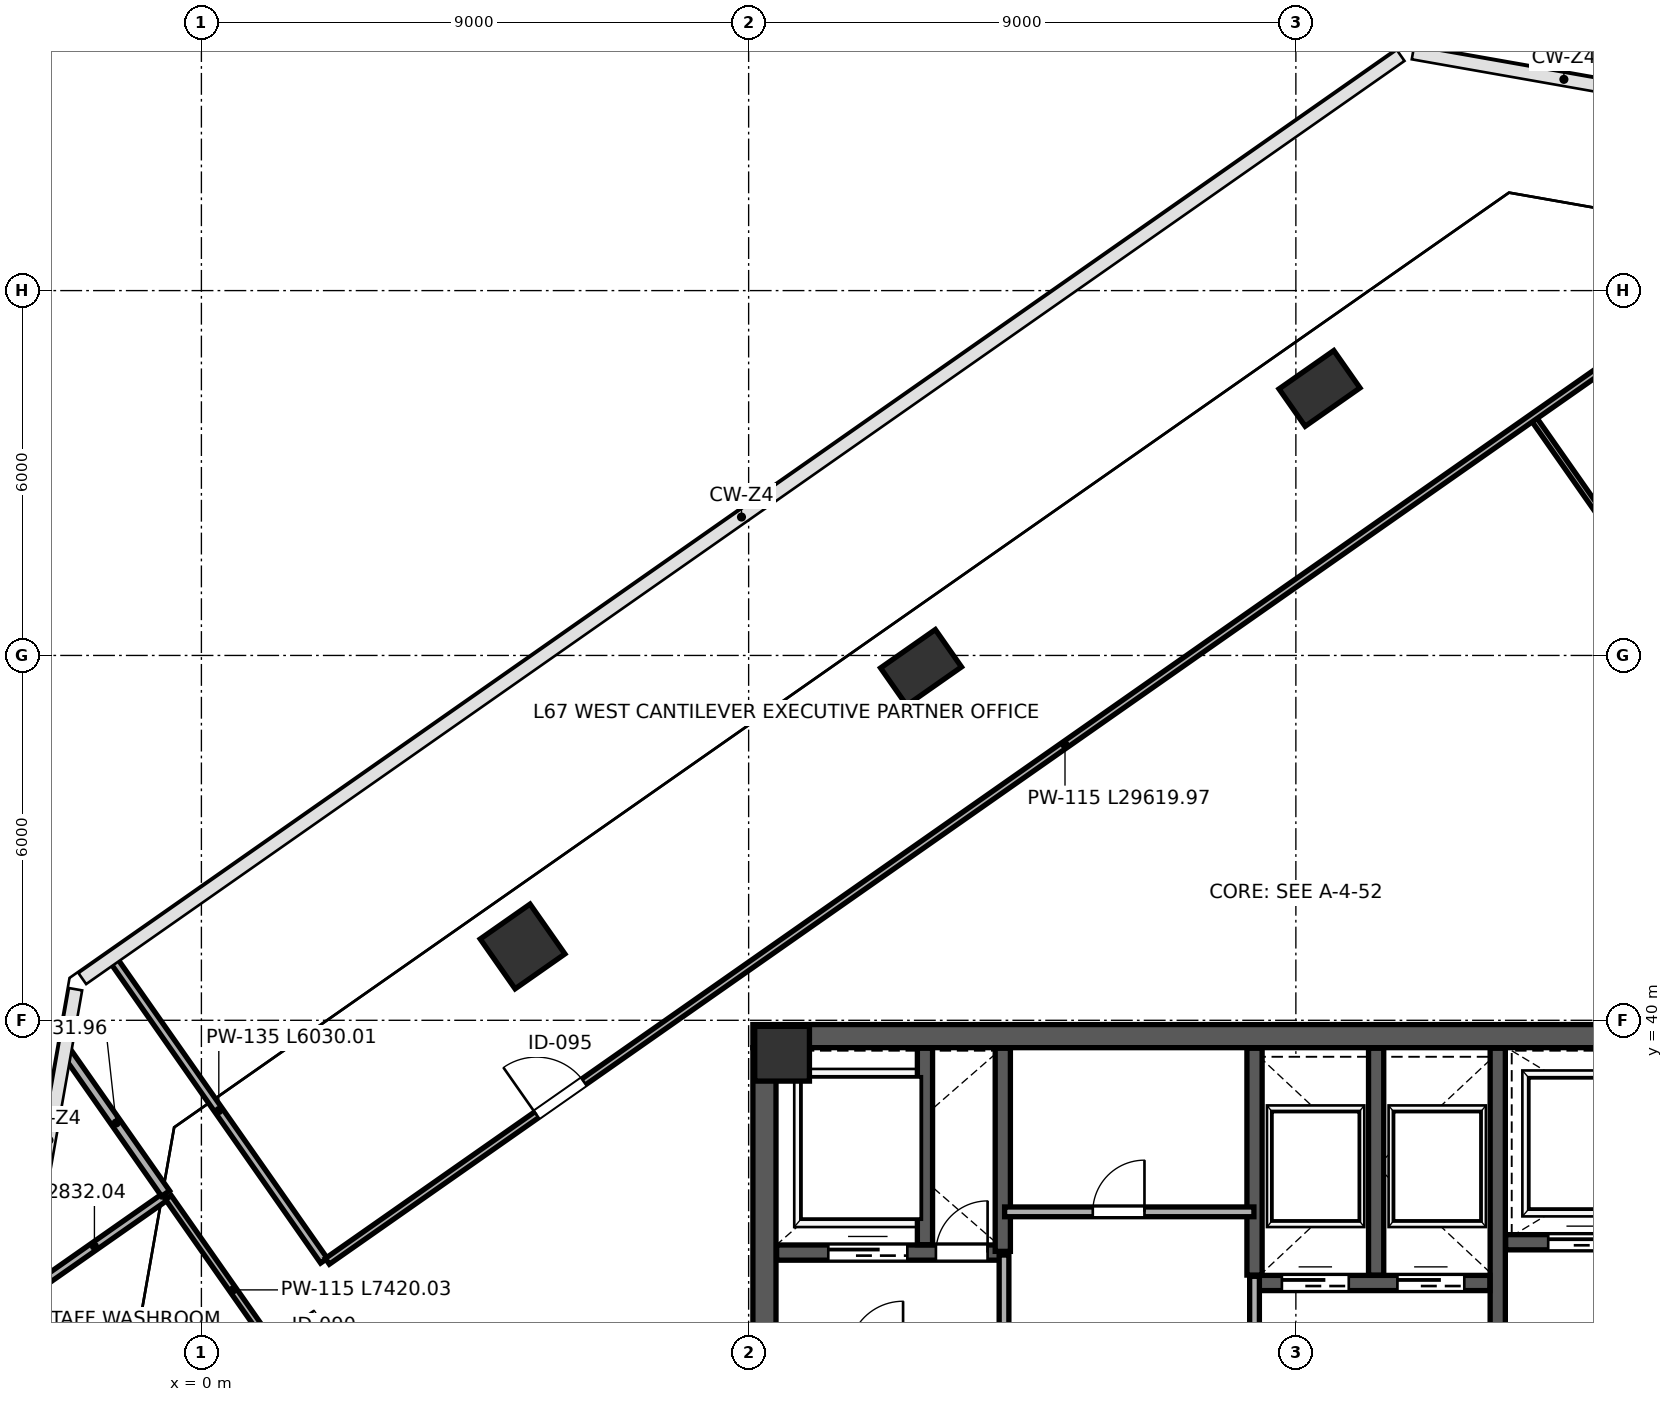
"""IFC4 building model, lengths in metres.
Left out: names, types, materials, properties, quantities, classifications, styles, units other than length and angle.
Written with IfcOpenShell. Run it as: python <this file> out.ifc"""

import sys

from ifc_helpers import new_model, si_unit, direction, frame, frame_2d, origin, origin_2d, place, context, subcontext, project, spatial, rectangle, extrude, source, transform, mapped, element, fill, save


model = new_model("IFC4")
c1 = context("Model", 3, precision=1e-05, world=origin(), true_north=direction((0.0, 1.0)))
c2 = subcontext(c1, "Body", "Model", "MODEL_VIEW")
j1 = project(units=[si_unit("LENGTHUNIT", "METRE"), si_unit("PLANEANGLEUNIT", "RADIAN")], contexts=[c1])
p1 = place(None, origin())
s1 = spatial("IfcSite", under=j1, at=p1, CompositionType="ELEMENT")
p2 = place(p1, origin())
s2 = spatial("IfcBuilding", under=s1, at=p2, CompositionType="ELEMENT")
p3 = place(p2, frame((0.0, 0.0, 298.8)))
s3 = spatial("IfcBuildingStorey", under=s2, at=p3, CompositionType="ELEMENT", Elevation=298.8)
m1 = source(origin(), c2, "Body", "SweptSolid", [
    extrude(rectangle(XDim=0.9, YDim=0.9, at=origin_2d()), origin(), (0.0, 0.0, 1.0), 4.198),
])
p4 = place(p3, frame((9.55, 39.45, 0.001), z_axis=(0.0, 0.0, 1.0), x_axis=(1.0, 0.0, 0.0)))
e1 = element("IfcColumn", 1, at=p4, inside=s3, PredefinedType="COLUMN", context=c2, shape_type="MappedRepresentation", body=[
    mapped(m1, transform((0.0, 0.0, 0.0), scale=1.0)),
])
m2 = source(origin(), c2, "Body", "SweptSolid", [
    extrude(rectangle(XDim=1.0, YDim=1.0, at=origin_2d()), origin(), (0.0, 0.0, 1.0), 4.198),
])
p5 = place(p3, frame((5.282, 41.214, 0.001), z_axis=(0.0, 0.0, 1.0), x_axis=(-0.573576436351, 0.819152044289, 0.0)))
e2 = element("IfcColumn", 2, at=p5, inside=s3, PredefinedType="COLUMN", context=c2, shape_type="MappedRepresentation", body=[
    mapped(m2, transform((0.0, 0.0, 0.0), scale=1.0)),
])
m3 = source(origin(), c2, "Body", "SweptSolid", [
    extrude(rectangle(XDim=0.75, YDim=1.1, at=origin_2d()), origin(), (0.0, 0.0, 1.0), 4.198),
])
for number, where, z_axis, x_axis in (
    (3, (11.835, 45.803, 0.001), (0.0, 0.0, 1.0), (-0.574, 0.819, 0.0)),
    (4, (18.388, 50.391, 0.001), (0.0, 0.0, 1.0), (-0.574, 0.819, 0.0)),
):
    element("IfcColumn", number, at=place(p3, frame(where, z_axis=z_axis, x_axis=x_axis)), inside=s3, PredefinedType="PILASTER", context=c2, shape_type="MappedRepresentation", body=[
        mapped(m3, transform((0.0, 0.0, 0.0), scale=1.0)),
    ])
p6 = place(p3, frame((9.26, 24.45, 0.0), z_axis=(0.0, 0.0, 1.0), x_axis=(0.0, 1.0, 0.0)))
e5 = element("IfcWall", 5, at=p6, inside=s3, PredefinedType="SHEAR", context=c2, shape_type="SweptSolid", body=[
    extrude(rectangle(XDim=15.1, YDim=0.38, at=frame_2d((7.55, 0.0))), origin(), (0.0, 0.0, 1.0), 3.96),
])
p7 = place(p6, frame((8.7, 0.0, 0.0)))
e6 = element("IfcOpeningElement", 6, at=p7, cuts=e5, PredefinedType="OPENING", context=c2, shape_type="SweptSolid", body=[
    extrude(rectangle(XDim=1.15, YDim=2.2, at=frame_2d((0.575, 1.1))), frame((0.0, 0.2, 0.0), z_axis=(0.0, -1.0, 0.0), x_axis=(1.0, 0.0, 0.0)), (0.0, 0.0, 1.0), 0.4),
])
p8 = place(p3, frame((9.07, 39.74, 0.0), z_axis=(0.0, 0.0, 1.0), x_axis=(1.0, 0.0, 0.0)))
e7 = element("IfcWall", 7, at=p8, inside=s3, PredefinedType="SHEAR", context=c2, shape_type="SweptSolid", body=[
    extrude(rectangle(XDim=17.86, YDim=0.38, at=frame_2d((8.93, 0.0))), origin(), (0.0, 0.0, 1.0), 3.96),
])
p9 = place(p3, frame((21.32, 32.12, 0.0), z_axis=(0.0, 0.0, 1.0), x_axis=(0.0, 1.0, 0.0)))
e8 = element("IfcWall", 8, at=p9, inside=s3, PredefinedType="SHEAR", context=c2, shape_type="SweptSolid", body=[
    extrude(rectangle(XDim=7.42, YDim=0.25, at=frame_2d((3.71, 0.0))), origin(), (0.0, 0.0, 1.0), 3.96),
])
p10 = place(p9, frame((1.4, 0.0, 0.0)))
e9 = element("IfcOpeningElement", 9, at=p10, cuts=e8, PredefinedType="OPENING", context=c2, shape_type="SweptSolid", body=[
    extrude(rectangle(XDim=1.15, YDim=2.2, at=frame_2d((0.575, 1.1))), frame((0.0, 0.135, 0.0), z_axis=(0.0, -1.0, 0.0), x_axis=(1.0, 0.0, 0.0)), (0.0, 0.0, 1.0), 0.27),
])
p11 = place(p3, frame((9.46, 36.18, 0.0), z_axis=(0.0, 0.0, 1.0), x_axis=(1.0, 0.0, 0.0)))
e10 = element("IfcWall", 10, at=p11, inside=s3, PredefinedType="SHEAR", context=c2, shape_type="SweptSolid", body=[
    extrude(rectangle(XDim=3.79, YDim=0.25, at=frame_2d((1.895, 0.0))), origin(), (0.0, 0.0, 1.0), 3.96),
])
p12 = place(p11, frame((2.62, 0.0, 0.0)))
e11 = element("IfcOpeningElement", 11, at=p12, cuts=e10, PredefinedType="OPENING", context=c2, shape_type="SweptSolid", body=[
    extrude(rectangle(XDim=0.85, YDim=2.1, at=frame_2d((0.425, 1.05))), frame((0.0, 0.135, 0.0), z_axis=(0.0, -1.0, 0.0), x_axis=(1.0, 0.0, 0.0)), (0.0, 0.0, 1.0), 0.27),
])
p13 = place(p11, frame((0.85, 0.0, 0.0)))
e12 = element("IfcOpeningElement", 12, at=p13, cuts=e10, PredefinedType="OPENING", context=c2, shape_type="SweptSolid", body=[
    extrude(rectangle(XDim=1.3, YDim=2.25, at=frame_2d((0.65, 1.125))), frame((0.0, 0.135, 0.0), z_axis=(0.0, -1.0, 0.0), x_axis=(1.0, 0.0, 0.0)), (0.0, 0.0, 1.0), 0.27),
])
p14 = place(p3, frame((11.9, 36.31, 0.0), z_axis=(0.0, 0.0, 1.0), x_axis=(0.0, 1.0, 0.0)))
e13 = element("IfcWall", 13, at=p14, inside=s3, PredefinedType="SHEAR", context=c2, shape_type="SweptSolid", body=[
    extrude(rectangle(XDim=3.23, YDim=0.25, at=frame_2d((1.615, 0.0))), origin(), (0.0, 0.0, 1.0), 3.96),
])
p15 = place(p3, frame((21.45, 36.35, 0.0), z_axis=(0.0, 0.0, 1.0), x_axis=(1.0, 0.0, 0.0)))
e14 = element("IfcWall", 14, at=p15, inside=s3, PredefinedType="SHEAR", context=c2, shape_type="SweptSolid", body=[
    extrude(rectangle(XDim=5.09, YDim=0.25, at=frame_2d((2.545, 0.0))), origin(), (0.0, 0.0, 1.0), 3.96),
])
p16 = place(p15, frame((0.7, 0.0, 0.0)))
e15 = element("IfcOpeningElement", 15, at=p16, cuts=e14, PredefinedType="OPENING", context=c2, shape_type="SweptSolid", body=[
    extrude(rectangle(XDim=1.2, YDim=2.2, at=frame_2d((0.6, 1.1))), frame((0.0, 0.135, 0.0), z_axis=(0.0, -1.0, 0.0), x_axis=(1.0, 0.0, 0.0)), (0.0, 0.0, 1.0), 0.27),
])
p17 = place(p15, frame((3.25, 0.0, 0.0)))
e16 = element("IfcOpeningElement", 16, at=p17, cuts=e14, PredefinedType="OPENING", context=c2, shape_type="SweptSolid", body=[
    extrude(rectangle(XDim=1.2, YDim=2.2, at=frame_2d((0.6, 1.1))), frame((0.0, 0.135, 0.0), z_axis=(0.0, -1.0, 0.0), x_axis=(1.0, 0.0, 0.0)), (0.0, 0.0, 1.0), 0.27),
])
p18 = place(p3, frame((13.18, 36.2, 0.0), z_axis=(0.0, 0.0, 1.0), x_axis=(0.0, 1.0, 0.0)))
e17 = element("IfcWall", 17, at=p18, inside=s3, PredefinedType="SHEAR", context=c2, shape_type="SweptSolid", body=[
    extrude(rectangle(XDim=3.34, YDim=0.25, at=frame_2d((1.67, 0.0))), origin(), (0.0, 0.0, 1.0), 3.96),
])
p19 = place(p3, frame((17.32, 35.68, 0.0), z_axis=(0.0, 0.0, 1.0), x_axis=(1.0, 0.0, 0.0)))
e18 = element("IfcWall", 18, at=p19, inside=s3, PredefinedType="SHEAR", context=c2, shape_type="SweptSolid", body=[
    extrude(rectangle(XDim=3.87, YDim=0.25, at=frame_2d((1.935, 0.0))), origin(), (0.0, 0.0, 1.0), 3.96),
])
p20 = place(p19, frame((0.45, 0.0, 0.0)))
e19 = element("IfcOpeningElement", 19, at=p20, cuts=e18, PredefinedType="OPENING", context=c2, shape_type="SweptSolid", body=[
    extrude(rectangle(XDim=1.1, YDim=2.2, at=frame_2d((0.55, 1.1))), frame((0.0, 0.135, 0.0), z_axis=(0.0, -1.0, 0.0), x_axis=(1.0, 0.0, 0.0)), (0.0, 0.0, 1.0), 0.27),
])
p21 = place(p19, frame((2.35, 0.0, 0.0)))
e20 = element("IfcOpeningElement", 20, at=p21, cuts=e18, PredefinedType="OPENING", context=c2, shape_type="SweptSolid", body=[
    extrude(rectangle(XDim=1.1, YDim=2.2, at=frame_2d((0.55, 1.1))), frame((0.0, 0.135, 0.0), z_axis=(0.0, -1.0, 0.0), x_axis=(1.0, 0.0, 0.0)), (0.0, 0.0, 1.0), 0.27),
])
for number, where, z_axis, x_axis in (
    (21, (17.32, 35.81, 0.0), (0.0, 0.0, 1.0), (0.0, 1.0, 0.0)),
    (22, (19.32, 35.81, 0.0), (0.0, 0.0, 1.0), (0.0, 1.0, 0.0)),
):
    element("IfcWall", number, at=place(p3, frame(where, z_axis=z_axis, x_axis=x_axis)), inside=s3, PredefinedType="SHEAR", context=c2, shape_type="SweptSolid", body=[
        extrude(rectangle(XDim=3.73, YDim=0.25, at=frame_2d((1.865, 0.0))), origin(), (0.0, 0.0, 1.0), 3.96),
    ])
p22 = place(p3, frame((13.2, 34.57, 0.0), z_axis=(0.0, 0.0, 1.0), x_axis=(0.0, 1.0, 0.0)))
e23 = element("IfcWall", 23, at=p22, inside=s3, PredefinedType="PARTITIONING", context=c2, shape_type="SweptSolid", body=[
    extrude(rectangle(XDim=1.57, YDim=0.16, at=frame_2d((0.785, 0.0))), origin(), (0.0, 0.0, 1.0), 3.96),
])
p23 = place(p3, frame((17.32, 33.86, 0.0), z_axis=(0.0, 0.0, 1.0), x_axis=(0.0, 1.0, 0.0)))
e24 = element("IfcWall", 24, at=p23, inside=s3, PredefinedType="PARTITIONING", context=c2, shape_type="SweptSolid", body=[
    extrude(rectangle(XDim=1.93, YDim=0.16, at=frame_2d((0.965, 0.0))), origin(), (0.0, 0.0, 1.0), 3.96),
])
p24 = place(p3, frame((13.21, 36.85, 0.0), z_axis=(0.0, 0.0, 1.0), x_axis=(1.0, 0.0, 0.0)))
e25 = element("IfcWall", 25, at=p24, inside=s3, PredefinedType="PARTITIONING", context=c2, shape_type="SweptSolid", body=[
    extrude(rectangle(XDim=4.1, YDim=0.16, at=frame_2d((2.05, 0.0))), origin(), (0.0, 0.0, 1.0), 3.96),
])
p25 = place(p24, frame((1.45, 0.0, 0.0)))
e26 = element("IfcOpeningElement", 26, at=p25, cuts=e25, PredefinedType="OPENING", context=c2, shape_type="SweptSolid", body=[
    extrude(rectangle(XDim=0.85, YDim=2.1, at=frame_2d((0.425, 1.05))), frame((0.0, 0.09, 0.0), z_axis=(0.0, -1.0, 0.0), x_axis=(1.0, 0.0, 0.0)), (0.0, 0.0, 1.0), 0.18),
])
p26 = place(p3, frame((-2.919, 35.471, 0.0), z_axis=(0.0, 0.0, 1.0), x_axis=(0.819098241059, 0.573653267657, 0.0)))
e27 = element("IfcWall", 27, at=p26, inside=s3, PredefinedType="PARTITIONING", context=c2, shape_type="SweptSolid", body=[
    extrude(rectangle(XDim=2.832, YDim=0.135, at=frame_2d((1.416, 0.0))), origin(), (0.0, 0.0, 1.0), 3.96),
])
p27 = place(p3, frame((-2.214, 39.471, 0.0), z_axis=(0.0, 0.0, 1.0), x_axis=(0.573653267657, -0.819098241059, 0.0)))
e28 = element("IfcWall", 28, at=p27, inside=s3, PredefinedType="PARTITIONING", context=c2, shape_type="SweptSolid", body=[
    extrude(rectangle(XDim=2.832, YDim=0.16, at=frame_2d((1.416, 0.0))), origin(), (0.0, 0.0, 1.0), 3.96),
])
p28 = place(p3, frame((-0.544, 37.086, 0.0), z_axis=(0.0, 0.0, 1.0), x_axis=(0.573568336404, -0.819157715873, 0.0)))
e29 = element("IfcWall", 29, at=p28, inside=s3, PredefinedType="PARTITIONING", context=c2, shape_type="SweptSolid", body=[
    extrude(rectangle(XDim=7.42, YDim=0.115, at=frame_2d((3.71, 0.0))), origin(), (0.0, 0.0, 1.0), 3.96),
])
p29 = place(p28, frame((2.9, 0.0, 0.0)))
e30 = element("IfcOpeningElement", 30, at=p29, cuts=e29, PredefinedType="OPENING", context=c2, shape_type="SweptSolid", body=[
    extrude(rectangle(XDim=0.9, YDim=2.15, at=frame_2d((0.45, 1.075))), frame((0.0, 0.067, 0.0), z_axis=(0.0, -1.0, 0.0), x_axis=(1.0, 0.0, 0.0)), (0.0, 0.0, 1.0), 0.135),
])
p30 = place(p28, frame((5.0, 0.0, 0.0)))
e31 = element("IfcOpeningElement", 31, at=p30, cuts=e29, PredefinedType="OPENING", context=c2, shape_type="SweptSolid", body=[
    extrude(rectangle(XDim=0.95, YDim=2.15, at=frame_2d((0.475, 1.075))), frame((0.0, 0.067, 0.0), z_axis=(0.0, -1.0, 0.0), x_axis=(1.0, 0.0, 0.0)), (0.0, 0.0, 1.0), 0.135),
])
p31 = place(p3, frame((21.918, 49.884, 0.0), z_axis=(0.0, 0.0, 1.0), x_axis=(0.57358495776, -0.819146077468, 0.0)))
e32 = element("IfcWall", 32, at=p31, inside=s3, PredefinedType="PARTITIONING", context=c2, shape_type="SweptSolid", body=[
    extrude(rectangle(XDim=25.79, YDim=0.1, at=frame_2d((12.895, 0.0))), origin(), (0.0, 0.0, 1.0), 3.96),
])
p32 = place(p31, frame((9.2, 0.0, 0.0)))
e33 = element("IfcOpeningElement", 33, at=p32, cuts=e32, PredefinedType="OPENING", context=c2, shape_type="SweptSolid", body=[
    extrude(rectangle(XDim=0.95, YDim=2.15, at=frame_2d((0.475, 1.075))), frame((0.0, 0.06, 0.0), z_axis=(0.0, -1.0, 0.0), x_axis=(1.0, 0.0, 0.0)), (0.0, 0.0, 1.0), 0.12),
])
p33 = place(p3, frame((-1.443, 40.985, 0.0), z_axis=(0.0, 0.0, 1.0), x_axis=(0.573587332855, -0.819144414367, 0.0)))
e34 = element("IfcWall", 34, at=p33, inside=s3, PredefinedType="PARTITIONING", context=c2, shape_type="SweptSolid", body=[
    extrude(rectangle(XDim=6.03, YDim=0.135, at=frame_2d((3.015, 0.0))), origin(), (0.0, 0.0, 1.0), 3.96),
])
p34 = place(p3, frame((2.071, 36.036, 0.0), z_axis=(0.0, 0.0, 1.0), x_axis=(0.819154854942, 0.573572422302, 0.0)))
e35 = element("IfcWall", 35, at=p34, inside=s3, PredefinedType="PARTITIONING", context=c2, shape_type="SweptSolid", body=[
    extrude(rectangle(XDim=29.62, YDim=0.115, at=frame_2d((14.81, 0.0))), origin(), (0.0, 0.0, 1.0), 3.96),
])
p35 = place(p34, frame((4.2, 0.0, 0.0)))
e36 = element("IfcOpeningElement", 36, at=p35, cuts=e35, PredefinedType="OPENING", context=c2, shape_type="SweptSolid", body=[
    extrude(rectangle(XDim=0.95, YDim=2.15, at=frame_2d((0.475, 1.075))), frame((0.0, 0.067, 0.0), z_axis=(0.0, -1.0, 0.0), x_axis=(1.0, 0.0, 0.0)), (0.0, 0.0, 1.0), 0.135),
])
m4 = source(origin(), c2, "Body", "SweptSolid", [
    extrude(rectangle(XDim=0.85, YDim=2.1, at=frame_2d((0.425, 1.05))), frame((0.0, 0.025, 0.0), z_axis=(0.0, -1.0, 0.0), x_axis=(1.0, 0.0, 0.0)), (0.0, 0.0, 1.0), 0.05),
])
p36 = place(p12, origin())
e37 = element("IfcDoor", 37, at=p36, inside=s3, OperationType="SINGLE_SWING_RIGHT", PredefinedType="DOOR", context=c2, shape_type="MappedRepresentation", body=[
    mapped(m4, transform((0.0, 0.0, 0.0), scale=1.0)),
])
fill(e11, e37)
m5 = source(origin(), c2, "Body", "SweptSolid", [
    extrude(rectangle(XDim=1.1, YDim=2.2, at=frame_2d((0.55, 1.1))), frame((0.0, 0.025, 0.0), z_axis=(0.0, -1.0, 0.0), x_axis=(1.0, 0.0, 0.0)), (0.0, 0.0, 1.0), 0.05),
])
p37 = place(p20, origin())
e38 = element("IfcDoor", 38, at=p37, inside=s3, OperationType="SLIDING_TO_LEFT", PredefinedType="DOOR", context=c2, shape_type="MappedRepresentation", body=[
    mapped(m5, transform((0.0, 0.0, 0.0), scale=1.0)),
])
fill(e19, e38)
p38 = place(p21, origin())
e39 = element("IfcDoor", 39, at=p38, inside=s3, OperationType="SLIDING_TO_RIGHT", PredefinedType="DOOR", context=c2, shape_type="MappedRepresentation", body=[
    mapped(m5, transform((0.0, 0.0, 0.0), scale=1.0)),
])
fill(e20, e39)
m6 = source(origin(), c2, "Body", "SweptSolid", [
    extrude(rectangle(XDim=1.2, YDim=2.2, at=frame_2d((0.6, 1.1))), frame((0.0, 0.025, 0.0), z_axis=(0.0, -1.0, 0.0), x_axis=(1.0, 0.0, 0.0)), (0.0, 0.0, 1.0), 0.05),
])
p39 = place(p16, origin())
e40 = element("IfcDoor", 40, at=p39, inside=s3, OperationType="SLIDING_TO_LEFT", PredefinedType="DOOR", context=c2, shape_type="MappedRepresentation", body=[
    mapped(m6, transform((0.0, 0.0, 0.0), scale=1.0)),
])
fill(e15, e40)
m7 = source(origin(), c2, "Body", "SweptSolid", [
    extrude(rectangle(XDim=1.3, YDim=2.25, at=frame_2d((0.65, 1.125))), frame((0.0, 0.025, 0.0), z_axis=(0.0, -1.0, 0.0), x_axis=(1.0, 0.0, 0.0)), (0.0, 0.0, 1.0), 0.05),
])
p40 = place(p13, origin())
e41 = element("IfcDoor", 41, at=p40, inside=s3, OperationType="SLIDING_TO_LEFT", PredefinedType="DOOR", context=c2, shape_type="MappedRepresentation", body=[
    mapped(m7, transform((0.0, 0.0, 0.0), scale=1.0)),
])
fill(e12, e41)
p41 = place(p25, origin())
e42 = element("IfcDoor", 42, at=p41, inside=s3, OperationType="SINGLE_SWING_RIGHT", PredefinedType="DOOR", context=c2, shape_type="MappedRepresentation", body=[
    mapped(m4, transform((0.0, 0.0, 0.0), scale=1.0)),
])
fill(e26, e42)
m8 = source(origin(), c2, "Body", "SweptSolid", [
    extrude(rectangle(XDim=0.95, YDim=2.15, at=frame_2d((0.475, 1.075))), frame((0.0, 0.025, 0.0), z_axis=(0.0, -1.0, 0.0), x_axis=(1.0, 0.0, 0.0)), (0.0, 0.0, 1.0), 0.05),
])
p42 = place(p35, origin())
e43 = element("IfcDoor", 43, at=p42, inside=s3, OperationType="SINGLE_SWING_LEFT", PredefinedType="DOOR", context=c2, shape_type="MappedRepresentation", body=[
    mapped(m8, transform((0.0, 0.0, 0.0), scale=1.0)),
])
fill(e36, e43)
save(model, sys.argv[1])
